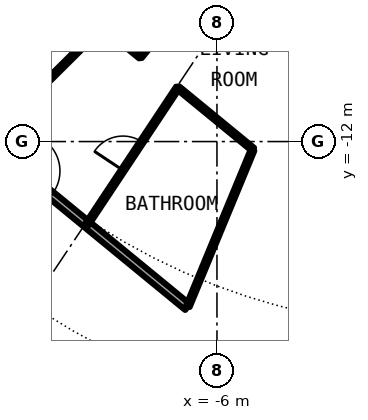
"""IFC4 building model, lengths in metres.
Left out: names, types, materials, properties, quantities, classifications, styles, units other than length and angle.
Written with IfcOpenShell. Run it as: python <this file> out.ifc"""

import sys

from ifc_helpers import new_model, si_unit, direction, frame, frame_2d, origin, place, context, subcontext, project, spatial, rectangle, extrude, element, fill, save


model = new_model("IFC4")
c1 = context("Model", 3, precision=1e-05, world=origin(), true_north=direction((0.0, 1.0)))
c2 = subcontext(c1, "Body", "Model", "MODEL_VIEW")
j1 = project(units=[si_unit("LENGTHUNIT", "METRE"), si_unit("PLANEANGLEUNIT", "RADIAN")], contexts=[c1])
p1 = place(None, origin())
s1 = spatial("IfcSite", under=j1, at=p1, CompositionType="ELEMENT")
p2 = place(p1, origin())
s2 = spatial("IfcBuilding", under=s1, at=p2, CompositionType="ELEMENT")
p3 = place(p2, frame((0.0, 0.0, 145.2)))
s3 = spatial("IfcBuildingStorey", under=s2, at=p3, CompositionType="ELEMENT", Elevation=145.2)
p4 = place(p3, frame((-14.717, -9.834, 0.0), z_axis=(0.0, 0.0, 1.0), x_axis=(0.773034536097, -0.634363938131, 0.0)))
e1 = element("IfcWall", 1, at=p4, inside=s3, PredefinedType="PARTITIONING", context=c2, shape_type="SweptSolid", body=[
    extrude(rectangle(XDim=10.277, YDim=0.2, at=frame_2d((5.138, 0.0))), origin(), (0.0, 0.0, 1.0), 2.7),
])
p5 = place(p4, frame((4.638, 0.0, 0.0)))
e2 = element("IfcOpeningElement", 2, at=p5, cuts=e1, PredefinedType="OPENING", context=c2, shape_type="SweptSolid", body=[
    extrude(rectangle(XDim=1.0, YDim=2.3, at=frame_2d((0.5, 1.15))), frame((0.0, 0.11, 0.0), z_axis=(0.0, -1.0, 0.0), x_axis=(1.0, 0.0, 0.0)), (0.0, 0.0, 1.0), 0.22),
])
p6 = place(p3, frame((-8.839, -9.098, 0.0), z_axis=(0.0, 0.0, 1.0), x_axis=(0.7731800648, -0.634186555673, 0.0)))
e3 = element("IfcWall", 3, at=p6, inside=s3, PredefinedType="PARTITIONING", context=c2, shape_type="SweptSolid", body=[
    extrude(rectangle(XDim=1.064, YDim=0.1, at=frame_2d((0.532, 0.0))), origin(), (0.0, 0.0, 1.0), 2.7),
])
p7 = place(p3, frame((-7.031, -10.582, 0.0), z_axis=(0.0, 0.0, 1.0), x_axis=(0.772943675046, -0.634474645046, 0.0)))
e4 = element("IfcWall", 4, at=p7, inside=s3, PredefinedType="PARTITIONING", context=c2, shape_type="SweptSolid", body=[
    extrude(rectangle(XDim=2.557, YDim=0.1, at=frame_2d((1.278, 0.0))), origin(), (0.0, 0.0, 1.0), 2.7),
])
p8 = place(p3, frame((-12.069, -12.007, 0.0), z_axis=(0.0, 0.0, 1.0), x_axis=(0.708822693149, 0.705386695138, 0.0)))
e5 = element("IfcWall", 5, at=p8, inside=s3, PredefinedType="PARTITIONING", context=c2, shape_type="SweptSolid", body=[
    extrude(rectangle(XDim=4.121, YDim=0.1, at=frame_2d((2.061, 0.0))), origin(), (0.0, 0.0, 1.0), 2.7),
])
p9 = place(p8, frame((1.611, 0.0, 0.0)))
e6 = element("IfcOpeningElement", 6, at=p9, cuts=e5, PredefinedType="OPENING", context=c2, shape_type="SweptSolid", body=[
    extrude(rectangle(XDim=0.9, YDim=2.3, at=frame_2d((0.45, 1.15))), frame((0.0, 0.06, 0.0), z_axis=(0.0, -1.0, 0.0), x_axis=(1.0, 0.0, 0.0)), (0.0, 0.0, 1.0), 0.12),
])
p10 = place(p3, frame((-9.421, -14.18, 0.0), z_axis=(0.0, 0.0, 1.0), x_axis=(0.553303732327, 0.832979579457, 0.0)))
e7 = element("IfcWall", 7, at=p10, inside=s3, PredefinedType="PARTITIONING", context=c2, shape_type="SweptSolid", body=[
    extrude(rectangle(XDim=4.319, YDim=0.1, at=frame_2d((2.16, 0.0))), origin(), (0.0, 0.0, 1.0), 2.7),
])
p11 = place(p10, frame((1.71, 0.0, 0.0)))
e8 = element("IfcOpeningElement", 8, at=p11, cuts=e7, PredefinedType="OPENING", context=c2, shape_type="SweptSolid", body=[
    extrude(rectangle(XDim=0.9, YDim=2.3, at=frame_2d((0.45, 1.15))), frame((0.0, 0.06, 0.0), z_axis=(0.0, -1.0, 0.0), x_axis=(1.0, 0.0, 0.0)), (0.0, 0.0, 1.0), 0.12),
])
p12 = place(p3, frame((-8.019, -9.771, 0.0), z_axis=(0.0, 0.0, 1.0), x_axis=(0.634401778971, 0.773003481776, 0.0)))
e9 = element("IfcWall", 9, at=p12, inside=s3, PredefinedType="PARTITIONING", context=c2, shape_type="SweptSolid", body=[
    extrude(rectangle(XDim=4.92, YDim=0.1, at=frame_2d((2.46, 0.0))), origin(), (0.0, 0.0, 1.0), 2.7),
])
p13 = place(p12, frame((2.01, 0.0, 0.0)))
e10 = element("IfcOpeningElement", 10, at=p13, cuts=e9, PredefinedType="OPENING", context=c2, shape_type="SweptSolid", body=[
    extrude(rectangle(XDim=0.9, YDim=2.3, at=frame_2d((0.45, 1.15))), frame((0.0, 0.06, 0.0), z_axis=(0.0, -1.0, 0.0), x_axis=(1.0, 0.0, 0.0)), (0.0, 0.0, 1.0), 0.12),
])
p14 = place(p3, frame((-5.063, -12.223, 0.0), z_axis=(0.0, 0.0, 1.0), x_axis=(-0.382498794932, -0.923955990226, 0.0)))
e11 = element("IfcWall", 11, at=p14, inside=s3, PredefinedType="PARTITIONING", context=c2, shape_type="SweptSolid", body=[
    extrude(rectangle(XDim=4.449, YDim=0.1, at=frame_2d((2.225, 0.0))), origin(), (0.0, 0.0, 1.0), 2.7),
])
p15 = place(p11, origin())
e12 = element("IfcDoor", 12, at=p15, inside=s3, OperationType="SINGLE_SWING_RIGHT", PredefinedType="DOOR", context=c2, shape_type="SweptSolid", body=[
    extrude(rectangle(XDim=0.9, YDim=2.3, at=frame_2d((0.45, 1.15))), frame((0.0, 0.025, 0.0), z_axis=(0.0, -1.0, 0.0), x_axis=(1.0, 0.0, 0.0)), (0.0, 0.0, 1.0), 0.05),
])
fill(e8, e12)
p16 = place(p9, origin())
e13 = element("IfcDoor", 13, at=p16, inside=s3, OperationType="SINGLE_SWING_RIGHT", PredefinedType="DOOR", context=c2, shape_type="SweptSolid", body=[
    extrude(rectangle(XDim=0.9, YDim=2.3, at=frame_2d((0.45, 1.15))), frame((0.0, 0.025, 0.0), z_axis=(0.0, -1.0, 0.0), x_axis=(1.0, 0.0, 0.0)), (0.0, 0.0, 1.0), 0.05),
])
fill(e6, e13)
save(model, sys.argv[1])
